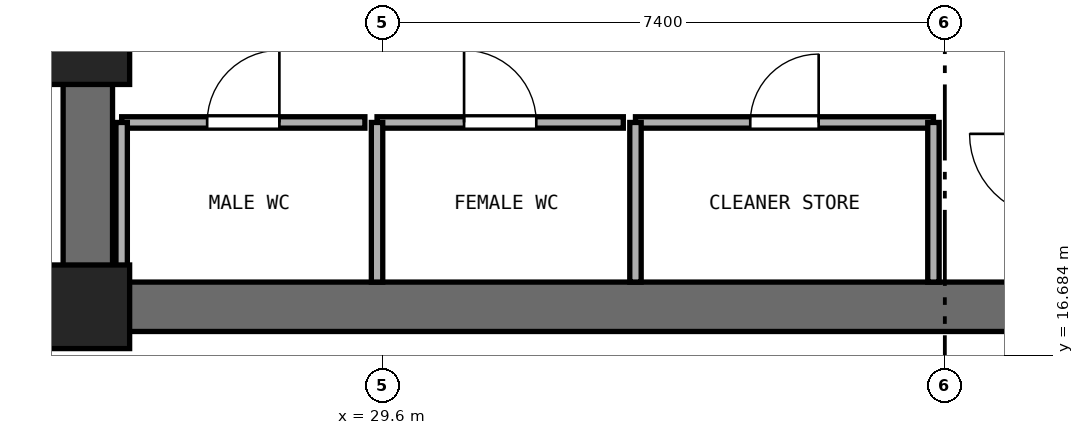
"""IFC4 building model, lengths in metres.
Left out: names, types, materials, properties, quantities, classifications, styles, units other than length and angle.
Written with IfcOpenShell. Run it as: python <this file> out.ifc"""

import sys

from ifc_helpers import new_model, si_unit, direction, frame, frame_2d, origin, origin_2d, place, context, subcontext, project, spatial, rectangle, extrude, element, fill, save


model = new_model("IFC4")
c1 = context("Model", 3, precision=1e-05, world=origin(), true_north=direction((0.0, 1.0)))
c2 = subcontext(c1, "Body", "Model", "MODEL_VIEW")
j1 = project(units=[si_unit("LENGTHUNIT", "METRE"), si_unit("PLANEANGLEUNIT", "RADIAN")], contexts=[c1])
p1 = place(None, origin())
s1 = spatial("IfcSite", under=j1, at=p1, CompositionType="ELEMENT")
p2 = place(p1, origin())
s2 = spatial("IfcBuilding", under=s1, at=p2, CompositionType="ELEMENT")
p3 = place(p2, origin())
s3 = spatial("IfcBuildingStorey", under=s2, at=p3, CompositionType="ELEMENT", Elevation=0.0)
p4 = place(p3, frame((25.4, 17.325, 0.0), z_axis=(0.0, 0.0, 1.0), x_axis=(1.0, 0.0, 0.0)))
e1 = element("IfcWall", 1, at=p4, inside=s3, PredefinedType="SHEAR", context=c2, shape_type="SweptSolid", body=[
    extrude(rectangle(XDim=23.2, YDim=0.65, at=frame_2d((11.6, 0.0))), origin(), (0.0, 0.0, 1.0), 4.66),
])
p5 = place(p3, frame((25.725, 17.65, 0.0), z_axis=(0.0, 0.0, 1.0), x_axis=(0.0, 1.0, 0.0)))
e2 = element("IfcWall", 2, at=p5, inside=s3, PredefinedType="SHEAR", context=c2, shape_type="SweptSolid", body=[
    extrude(rectangle(XDim=15.1, YDim=0.65, at=frame_2d((7.55, 0.0))), origin(), (0.0, 0.0, 1.0), 4.66),
])
p6 = place(p5, frame((6.8, 0.0, 0.0)))
e3 = element("IfcOpeningElement", 3, at=p6, cuts=e2, PredefinedType="OPENING", context=c2, shape_type="SweptSolid", body=[
    extrude(rectangle(XDim=1.5, YDim=2.15, at=frame_2d((0.75, 1.075))), frame((0.0, 0.335, 0.0), z_axis=(0.0, -1.0, 0.0), x_axis=(1.0, 0.0, 0.0)), (0.0, 0.0, 1.0), 0.67),
])
for number, where, z_axis, x_axis in (
    (4, (25.725, 17.325, 0.0), (0.0, 0.0, 1.0), (1.0, 0.0, 0.0)),
    (5, (25.725, 20.8, 0.0), (0.0, 0.0, 1.0), (1.0, 0.0, 0.0)),
):
    element("IfcColumn", number, at=place(p3, frame(where, z_axis=z_axis, x_axis=x_axis)), inside=s3, PredefinedType="PILASTER", context=c2, shape_type="SweptSolid", body=[
        extrude(rectangle(XDim=1.1, YDim=1.1, at=origin_2d()), origin(), (0.0, 0.0, 1.0), 5.0),
    ])
p7 = place(p3, frame((26.17, 19.75, 0.0), z_axis=(0.0, 0.0, 1.0), x_axis=(1.0, 0.0, 0.0)))
e6 = element("IfcWall", 6, at=p7, inside=s3, PredefinedType="PARTITIONING", context=c2, shape_type="SweptSolid", body=[
    extrude(rectangle(XDim=3.2, YDim=0.15, at=frame_2d((1.6, 0.0))), origin(), (0.0, 0.0, 1.0), 4.66),
])
p8 = place(p7, frame((1.125, 0.0, 0.0)))
e7 = element("IfcOpeningElement", 7, at=p8, cuts=e6, PredefinedType="OPENING", context=c2, shape_type="SweptSolid", body=[
    extrude(rectangle(XDim=0.95, YDim=2.1, at=frame_2d((0.475, 1.05))), frame((0.0, 0.085, 0.0), z_axis=(0.0, -1.0, 0.0), x_axis=(1.0, 0.0, 0.0)), (0.0, 0.0, 1.0), 0.17),
])
p9 = place(p3, frame((26.17, 17.65, 0.0), z_axis=(0.0, 0.0, 1.0), x_axis=(0.0, 1.0, 0.0)))
e8 = element("IfcWall", 8, at=p9, inside=s3, PredefinedType="PARTITIONING", context=c2, shape_type="SweptSolid", body=[
    extrude(rectangle(XDim=2.1, YDim=0.15, at=frame_2d((1.05, 0.0))), origin(), (0.0, 0.0, 1.0), 4.66),
])
p10 = place(p3, frame((29.53, 19.75, 0.0), z_axis=(0.0, 0.0, 1.0), x_axis=(1.0, 0.0, 0.0)))
e9 = element("IfcWall", 9, at=p10, inside=s3, PredefinedType="PARTITIONING", context=c2, shape_type="SweptSolid", body=[
    extrude(rectangle(XDim=3.24, YDim=0.15, at=frame_2d((1.62, 0.0))), origin(), (0.0, 0.0, 1.0), 4.66),
])
p11 = place(p10, frame((1.145, 0.0, 0.0)))
e10 = element("IfcOpeningElement", 10, at=p11, cuts=e9, PredefinedType="OPENING", context=c2, shape_type="SweptSolid", body=[
    extrude(rectangle(XDim=0.95, YDim=2.1, at=frame_2d((0.475, 1.05))), frame((0.0, 0.085, 0.0), z_axis=(0.0, -1.0, 0.0), x_axis=(1.0, 0.0, 0.0)), (0.0, 0.0, 1.0), 0.17),
])
p12 = place(p3, frame((29.53, 17.65, 0.0), z_axis=(0.0, 0.0, 1.0), x_axis=(0.0, 1.0, 0.0)))
e11 = element("IfcWall", 11, at=p12, inside=s3, PredefinedType="PARTITIONING", context=c2, shape_type="SweptSolid", body=[
    extrude(rectangle(XDim=2.1, YDim=0.15, at=frame_2d((1.05, 0.0))), origin(), (0.0, 0.0, 1.0), 4.66),
])
p13 = place(p3, frame((32.93, 19.75, 0.0), z_axis=(0.0, 0.0, 1.0), x_axis=(1.0, 0.0, 0.0)))
e12 = element("IfcWall", 12, at=p13, inside=s3, PredefinedType="PARTITIONING", context=c2, shape_type="SweptSolid", body=[
    extrude(rectangle(XDim=3.92, YDim=0.15, at=frame_2d((1.96, 0.0))), origin(), (0.0, 0.0, 1.0), 4.66),
])
p14 = place(p13, frame((1.51, 0.0, 0.0)))
e13 = element("IfcOpeningElement", 13, at=p14, cuts=e12, PredefinedType="OPENING", context=c2, shape_type="SweptSolid", body=[
    extrude(rectangle(XDim=0.9, YDim=2.1, at=frame_2d((0.45, 1.05))), frame((0.0, 0.085, 0.0), z_axis=(0.0, -1.0, 0.0), x_axis=(1.0, 0.0, 0.0)), (0.0, 0.0, 1.0), 0.17),
])
for number, where, z_axis, x_axis in (
    (14, (32.93, 17.65, 0.0), (0.0, 0.0, 1.0), (0.0, 1.0, 0.0)),
    (15, (36.85, 17.65, 0.0), (0.0, 0.0, 1.0), (0.0, 1.0, 0.0)),
):
    element("IfcWall", number, at=place(p3, frame(where, z_axis=z_axis, x_axis=x_axis)), inside=s3, PredefinedType="PARTITIONING", context=c2, shape_type="SweptSolid", body=[
        extrude(rectangle(XDim=2.1, YDim=0.15, at=frame_2d((1.05, 0.0))), origin(), (0.0, 0.0, 1.0), 4.66),
    ])
p15 = place(p8, origin())
e16 = element("IfcDoor", 16, at=p15, inside=s3, OperationType="SINGLE_SWING_RIGHT", PredefinedType="DOOR", context=c2, shape_type="SweptSolid", body=[
    extrude(rectangle(XDim=0.95, YDim=2.1, at=frame_2d((0.475, 1.05))), frame((0.0, 0.025, 0.0), z_axis=(0.0, -1.0, 0.0), x_axis=(1.0, 0.0, 0.0)), (0.0, 0.0, 1.0), 0.05),
])
fill(e7, e16)
p16 = place(p11, origin())
e17 = element("IfcDoor", 17, at=p16, inside=s3, OperationType="SINGLE_SWING_LEFT", PredefinedType="DOOR", context=c2, shape_type="SweptSolid", body=[
    extrude(rectangle(XDim=0.95, YDim=2.1, at=frame_2d((0.475, 1.05))), frame((0.0, 0.025, 0.0), z_axis=(0.0, -1.0, 0.0), x_axis=(1.0, 0.0, 0.0)), (0.0, 0.0, 1.0), 0.05),
])
fill(e10, e17)
p17 = place(p14, origin())
e18 = element("IfcDoor", 18, at=p17, inside=s3, OperationType="SINGLE_SWING_RIGHT", PredefinedType="DOOR", context=c2, shape_type="SweptSolid", body=[
    extrude(rectangle(XDim=0.9, YDim=2.1, at=frame_2d((0.45, 1.05))), frame((0.0, 0.025, 0.0), z_axis=(0.0, -1.0, 0.0), x_axis=(1.0, 0.0, 0.0)), (0.0, 0.0, 1.0), 0.05),
])
fill(e13, e18)
save(model, sys.argv[1])
